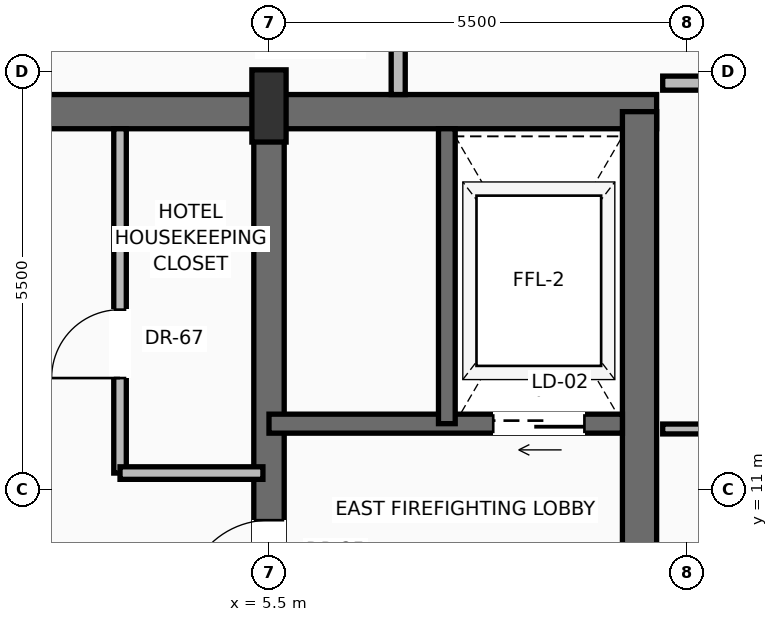
"""IFC4 building model, lengths in metres.
Left out: names, types, materials, properties, quantities, classifications, styles, units other than length and angle.
Written with IfcOpenShell. Run it as: python <this file> out.ifc"""

import sys

from ifc_helpers import new_model, si_unit, direction, frame, frame_2d, origin, origin_2d, place, context, subcontext, project, spatial, rectangle, extrude, source, transform, mapped, element, fill, save


model = new_model("IFC4")
c1 = context("Model", 3, precision=1e-05, world=origin(), true_north=direction((0.0, 1.0)))
c2 = subcontext(c1, "Body", "Model", "MODEL_VIEW")
j1 = project(units=[si_unit("LENGTHUNIT", "METRE"), si_unit("PLANEANGLEUNIT", "RADIAN")], contexts=[c1])
p1 = place(None, origin())
s1 = spatial("IfcSite", under=j1, at=p1, CompositionType="ELEMENT")
p2 = place(p1, origin())
s2 = spatial("IfcBuilding", under=s1, at=p2, CompositionType="ELEMENT")
p3 = place(p2, frame((0.0, 0.0, 286.8)))
s3 = spatial("IfcBuildingStorey", under=s2, at=p3, CompositionType="ELEMENT", Elevation=286.8)
p4 = place(p3, frame((-10.6, 15.975, 0.0), z_axis=(0.0, 0.0, 1.0), x_axis=(1.0, 0.0, 0.0)))
e1 = element("IfcWall", 1, at=p4, inside=s3, PredefinedType="SHEAR", context=c2, shape_type="SweptSolid", body=[
    extrude(rectangle(XDim=21.2, YDim=0.45, at=frame_2d((10.6, 0.0))), origin(), (0.0, 0.0, 1.0), 3.24),
])
p5 = place(p4, frame((3.17, 0.0, 0.0)))
e2 = element("IfcOpeningElement", 2, at=p5, cuts=e1, PredefinedType="OPENING", context=c2, shape_type="SweptSolid", body=[
    extrude(rectangle(XDim=1.3, YDim=2.3, at=frame_2d((0.65, 1.15))), frame((0.0, 0.235, 0.0), z_axis=(0.0, -1.0, 0.0), x_axis=(1.0, 0.0, 0.0)), (0.0, 0.0, 1.0), 0.47),
])
p6 = place(p4, frame((9.6, 0.0, 0.0)))
e3 = element("IfcOpeningElement", 3, at=p6, cuts=e1, PredefinedType="OPENING", context=c2, shape_type="SweptSolid", body=[
    extrude(rectangle(XDim=2.0, YDim=2.4, at=frame_2d((1.0, 1.2))), frame((0.0, 0.235, 0.0), z_axis=(0.0, -1.0, 0.0), x_axis=(1.0, 0.0, 0.0)), (0.0, 0.0, 1.0), 0.47),
])
p7 = place(p3, frame((10.375, 0.625, 0.0), z_axis=(0.0, 0.0, 1.0), x_axis=(0.0, 1.0, 0.0)))
e4 = element("IfcWall", 4, at=p7, inside=s3, PredefinedType="SHEAR", context=c2, shape_type="SweptSolid", body=[
    extrude(rectangle(XDim=15.35, YDim=0.45, at=frame_2d((7.675, 0.0))), origin(), (0.0, 0.0, 1.0), 3.24),
])
p8 = place(p3, frame((5.5, 0.625, 0.0), z_axis=(0.0, 0.0, 1.0), x_axis=(0.0, 1.0, 0.0)))
e5 = element("IfcWall", 5, at=p8, inside=s3, PredefinedType="SHEAR", context=c2, shape_type="SweptSolid", body=[
    extrude(rectangle(XDim=15.35, YDim=0.4, at=frame_2d((7.675, 0.0))), origin(), (0.0, 0.0, 1.0), 3.24),
])
p9 = place(p8, frame((8.875, 0.0, 0.0)))
e6 = element("IfcOpeningElement", 6, at=p9, cuts=e5, PredefinedType="OPENING", context=c2, shape_type="SweptSolid", body=[
    extrude(rectangle(XDim=1.1, YDim=2.2, at=frame_2d((0.55, 1.1))), frame((0.0, 0.21, 0.0), z_axis=(0.0, -1.0, 0.0), x_axis=(1.0, 0.0, 0.0)), (0.0, 0.0, 1.0), 0.42),
])
m1 = source(origin(), c2, "Body", "SweptSolid", [
    extrude(rectangle(XDim=0.45, YDim=0.95, at=origin_2d()), origin(), (0.0, 0.0, 1.0), 3.45),
])
p10 = place(p3, frame((5.5, 16.05, 0.0), z_axis=(0.0, 0.0, 1.0), x_axis=(1.0, 0.0, 0.0)))
e7 = element("IfcColumn", 7, at=p10, inside=s3, PredefinedType="PILASTER", context=c2, shape_type="MappedRepresentation", body=[
    mapped(m1, transform((0.0, 0.0, 0.0), scale=1.0)),
])
p11 = place(p3, frame((7.708, 31.656, 0.0), z_axis=(0.0, 0.0, 1.0), x_axis=(0.504292445958, -0.86353293449, 0.0)))
e8 = element("IfcWall", 8, at=p11, inside=s3, PredefinedType="SOLIDWALL", context=c2, shape_type="SweptSolid", body=[
    extrude(rectangle(XDim=20.096, YDim=0.28, at=frame_2d((10.048, 0.0))), origin(), (0.0, 0.0, 1.0), 2.82),
])
p12 = place(p11, frame((4.823, 0.0, 0.0)))
e9 = element("IfcOpeningElement", 9, at=p12, cuts=e8, PredefinedType="OPENING", context=c2, shape_type="SweptSolid", body=[
    extrude(rectangle(XDim=1.6, YDim=2.35, at=frame_2d((0.8, 1.175))), frame((0.0, 0.15, 0.0), z_axis=(0.0, -1.0, 0.0), x_axis=(1.0, 0.0, 0.0)), (0.0, 0.0, 1.0), 0.3),
])
p13 = place(p11, frame((13.666, 0.0, 0.9)))
e10 = element("IfcOpeningElement", 10, at=p13, cuts=e8, PredefinedType="OPENING", context=c2, shape_type="SweptSolid", body=[
    extrude(rectangle(XDim=1.55, YDim=1.75, at=frame_2d((0.775, 0.875))), frame((0.0, 0.15, 0.0), z_axis=(0.0, -1.0, 0.0), x_axis=(1.0, 0.0, 0.0)), (0.0, 0.0, 1.0), 0.3),
])
p14 = place(p3, frame((10.15, 11.87, 0.0), z_axis=(0.0, 0.0, 1.0), x_axis=(-1.0, 0.0, 0.0)))
e11 = element("IfcWall", 11, at=p14, inside=s3, PredefinedType="SOLIDWALL", context=c2, shape_type="SweptSolid", body=[
    extrude(rectangle(XDim=4.65, YDim=0.25, at=frame_2d((2.325, 0.0))), origin(), (0.0, 0.0, 1.0), 3.24),
])
p15 = place(p14, frame((0.5, 0.0, 0.0)))
e12 = element("IfcOpeningElement", 12, at=p15, cuts=e11, PredefinedType="OPENING", context=c2, shape_type="SweptSolid", body=[
    extrude(rectangle(XDim=1.2, YDim=2.25, at=frame_2d((0.6, 1.125))), frame((0.0, 0.135, 0.0), z_axis=(0.0, -1.0, 0.0), x_axis=(1.0, 0.0, 0.0)), (0.0, 0.0, 1.0), 0.27),
])
p16 = place(p3, frame((7.84, 11.87, 0.0), z_axis=(0.0, 0.0, 1.0), x_axis=(0.0, 1.0, 0.0)))
e13 = element("IfcWall", 13, at=p16, inside=s3, PredefinedType="SOLIDWALL", context=c2, shape_type="SweptSolid", body=[
    extrude(rectangle(XDim=3.88, YDim=0.22, at=frame_2d((1.94, 0.0))), origin(), (0.0, 0.0, 1.0), 3.24),
])
p17 = place(p3, frame((3.54, 11.22, 0.0), z_axis=(0.0, 0.0, 1.0), x_axis=(0.0, 1.0, 0.0)))
e14 = element("IfcWall", 14, at=p17, inside=s3, PredefinedType="PARTITIONING", context=c2, shape_type="SweptSolid", body=[
    extrude(rectangle(XDim=4.53, YDim=0.165, at=frame_2d((2.265, 0.0))), origin(), (0.0, 0.0, 1.0), 3.232),
])
p18 = place(p17, frame((1.25, 0.0, 0.0)))
e15 = element("IfcOpeningElement", 15, at=p18, cuts=e14, PredefinedType="OPENING", context=c2, shape_type="SweptSolid", body=[
    extrude(rectangle(XDim=0.9, YDim=2.1, at=frame_2d((0.45, 1.05))), frame((0.0, 0.093, 0.0), z_axis=(0.0, -1.0, 0.0), x_axis=(1.0, 0.0, 0.0)), (0.0, 0.0, 1.0), 0.185),
])
p19 = place(p3, frame((3.54, 11.22, 0.0), z_axis=(0.0, 0.0, 1.0), x_axis=(1.0, 0.0, 0.0)))
e16 = element("IfcWall", 16, at=p19, inside=s3, PredefinedType="PARTITIONING", context=c2, shape_type="SweptSolid", body=[
    extrude(rectangle(XDim=1.88, YDim=0.165, at=frame_2d((0.94, 0.0))), origin(), (0.0, 0.0, 1.0), 3.232),
])
p20 = place(p3, frame((7.2, 16.2, 0.0), z_axis=(0.0, 0.0, 1.0), x_axis=(0.0, 1.0, 0.0)))
e17 = element("IfcWall", 17, at=p20, inside=s3, PredefinedType="PARTITIONING", context=c2, shape_type="SweptSolid", body=[
    extrude(rectangle(XDim=10.4, YDim=0.185, at=frame_2d((5.2, 0.0))), origin(), (0.0, 0.0, 1.0), 3.232),
])
p21 = place(p20, frame((2.198, 0.0, 0.0)))
e18 = element("IfcOpeningElement", 18, at=p21, cuts=e17, PredefinedType="OPENING", context=c2, shape_type="SweptSolid", body=[
    extrude(rectangle(XDim=1.05, YDim=2.25, at=frame_2d((0.525, 1.125))), frame((0.0, 0.103, 0.0), z_axis=(0.0, -1.0, 0.0), x_axis=(1.0, 0.0, 0.0)), (0.0, 0.0, 1.0), 0.205),
])
p22 = place(p20, frame((5.252, 0.0, 0.0)))
e19 = element("IfcOpeningElement", 19, at=p22, cuts=e17, PredefinedType="OPENING", context=c2, shape_type="SweptSolid", body=[
    extrude(rectangle(XDim=1.05, YDim=2.25, at=frame_2d((0.525, 1.125))), frame((0.0, 0.103, 0.0), z_axis=(0.0, -1.0, 0.0), x_axis=(1.0, 0.0, 0.0)), (0.0, 0.0, 1.0), 0.205),
])
p23 = place(p20, frame((8.369, 0.0, 0.0)))
e20 = element("IfcOpeningElement", 20, at=p23, cuts=e17, PredefinedType="OPENING", context=c2, shape_type="SweptSolid", body=[
    extrude(rectangle(XDim=1.05, YDim=2.25, at=frame_2d((0.525, 1.125))), frame((0.0, 0.103, 0.0), z_axis=(0.0, -1.0, 0.0), x_axis=(1.0, 0.0, 0.0)), (0.0, 0.0, 1.0), 0.205),
])
p24 = place(p3, frame((10.68, 16.35, 0.0), z_axis=(0.0, 0.0, 1.0), x_axis=(1.0, 0.0, 0.0)))
e21 = element("IfcWall", 21, at=p24, inside=s3, PredefinedType="PARTITIONING", context=c2, shape_type="SweptSolid", body=[
    extrude(rectangle(XDim=6.117, YDim=0.185, at=frame_2d((3.059, 0.0))), origin(), (0.0, 0.0, 1.0), 3.232),
])
p25 = place(p24, frame((1.718, 0.0, 0.0)))
e22 = element("IfcOpeningElement", 22, at=p25, cuts=e21, PredefinedType="OPENING", context=c2, shape_type="SweptSolid", body=[
    extrude(rectangle(XDim=1.05, YDim=2.25, at=frame_2d((0.525, 1.125))), frame((0.0, 0.103, 0.0), z_axis=(0.0, -1.0, 0.0), x_axis=(1.0, 0.0, 0.0)), (0.0, 0.0, 1.0), 0.205),
])
p26 = place(p3, frame((10.68, 11.8, 0.0), z_axis=(0.0, 0.0, 1.0), x_axis=(1.0, 0.0, 0.0)))
e23 = element("IfcWall", 23, at=p26, inside=s3, PredefinedType="PARTITIONING", context=c2, shape_type="SweptSolid", body=[
    extrude(rectangle(XDim=8.774, YDim=0.13, at=frame_2d((4.387, 0.0))), origin(), (0.0, 0.0, 1.0), 3.232),
])
p27 = place(p26, frame((3.508, 0.0, 0.0)))
e24 = element("IfcOpeningElement", 24, at=p27, cuts=e23, PredefinedType="OPENING", context=c2, shape_type="SweptSolid", body=[
    extrude(rectangle(XDim=0.95, YDim=2.2, at=frame_2d((0.475, 1.1))), frame((0.0, 0.075, 0.0), z_axis=(0.0, -1.0, 0.0), x_axis=(1.0, 0.0, 0.0)), (0.0, 0.0, 1.0), 0.15),
])
m2 = source(origin(), c2, "Body", "SweptSolid", [
    extrude(rectangle(XDim=1.1, YDim=2.2, at=frame_2d((0.55, 1.1))), frame((0.0, 0.025, 0.0), z_axis=(0.0, -1.0, 0.0), x_axis=(1.0, 0.0, 0.0)), (0.0, 0.0, 1.0), 0.05),
])
p28 = place(p9, origin())
e25 = element("IfcDoor", 25, at=p28, inside=s3, OperationType="SINGLE_SWING_LEFT", PredefinedType="DOOR", context=c2, shape_type="MappedRepresentation", body=[
    mapped(m2, transform((0.0, 0.0, 0.0), scale=1.0)),
])
fill(e6, e25)
m3 = source(origin(), c2, "Body", "SweptSolid", [
    extrude(rectangle(XDim=1.2, YDim=2.25, at=frame_2d((0.6, 1.125))), frame((0.0, 0.025, 0.0), z_axis=(0.0, -1.0, 0.0), x_axis=(1.0, 0.0, 0.0)), (0.0, 0.0, 1.0), 0.05),
])
p29 = place(p15, origin())
e26 = element("IfcDoor", 26, at=p29, inside=s3, OperationType="SLIDING_TO_RIGHT", PredefinedType="DOOR", context=c2, shape_type="MappedRepresentation", body=[
    mapped(m3, transform((0.0, 0.0, 0.0), scale=1.0)),
])
fill(e12, e26)
m4 = source(origin(), c2, "Body", "SweptSolid", [
    extrude(rectangle(XDim=0.9, YDim=2.1, at=frame_2d((0.45, 1.05))), frame((0.0, 0.025, 0.0), z_axis=(0.0, -1.0, 0.0), x_axis=(1.0, 0.0, 0.0)), (0.0, 0.0, 1.0), 0.05),
])
p30 = place(p18, origin())
e27 = element("IfcDoor", 27, at=p30, inside=s3, OperationType="SINGLE_SWING_LEFT", PredefinedType="DOOR", context=c2, shape_type="MappedRepresentation", body=[
    mapped(m4, transform((0.0, 0.0, 0.0), scale=1.0)),
])
fill(e15, e27)
save(model, sys.argv[1])
